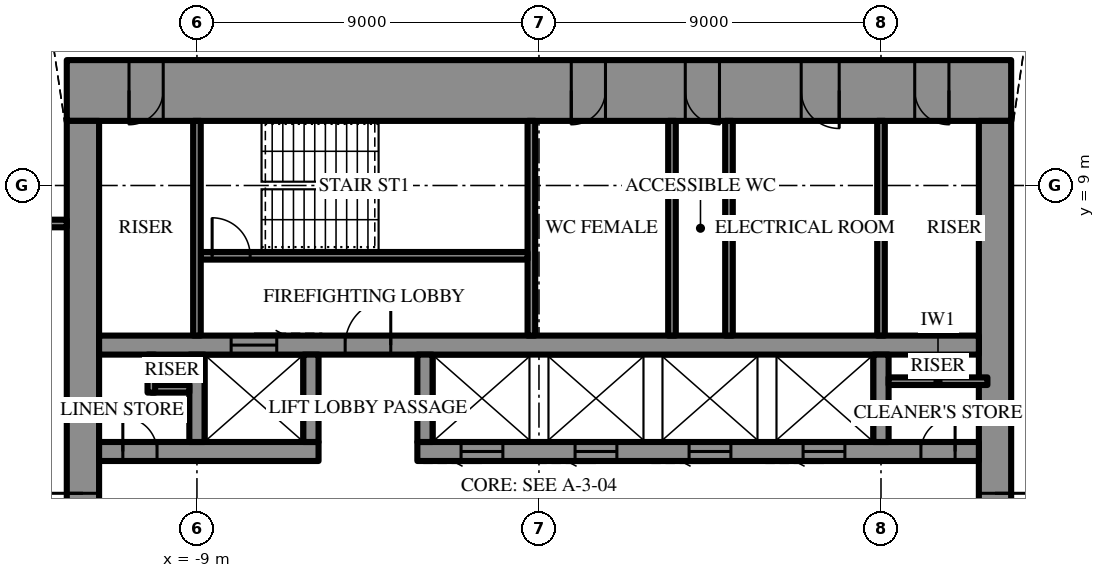
"""IFC4 building model, lengths in metres.
Left out: names, types, materials, properties, quantities, classifications, styles, units other than length and angle.
Written with IfcOpenShell. Run it as: python <this file> out.ifc"""

import sys

from ifc_helpers import new_model, si_unit, direction, frame, frame_2d, origin, place, context, subcontext, project, spatial, rectangle, extrude, element, fill, save


model = new_model("IFC4")
c1 = context("Model", 3, precision=1e-05, world=origin(), true_north=direction((0.0, 1.0)))
c2 = subcontext(c1, "Body", "Model", "MODEL_VIEW")
j1 = project(units=[si_unit("LENGTHUNIT", "METRE"), si_unit("PLANEANGLEUNIT", "RADIAN")], contexts=[c1])
p1 = place(None, origin())
s1 = spatial("IfcSite", under=j1, at=p1, CompositionType="ELEMENT")
p2 = place(p1, origin())
s2 = spatial("IfcBuilding", under=s1, at=p2, CompositionType="ELEMENT")
p3 = place(p2, frame((0.0, 0.0, 378.7)))
s3 = spatial("IfcBuildingStorey", under=s2, at=p3, CompositionType="ELEMENT", Elevation=378.7)
p4 = place(p3, frame((-12.425, 11.5, 0.0), z_axis=(0.0, 0.0, 1.0), x_axis=(1.0, 0.0, 0.0)))
e1 = element("IfcWall", 1, at=p4, inside=s3, PredefinedType="SHEAR", context=c2, shape_type="SweptSolid", body=[
    extrude(rectangle(XDim=24.85, YDim=1.6, at=frame_2d((12.425, 0.0))), origin(), (0.0, 0.0, 1.0), 4.2),
])
p5 = place(p4, frame((13.275, 0.0, 0.0)))
e2 = element("IfcOpeningElement", 2, at=p5, cuts=e1, PredefinedType="OPENING", context=c2, shape_type="SweptSolid", body=[
    extrude(rectangle(XDim=0.9, YDim=2.2, at=frame_2d((0.45, 1.1))), frame((0.0, 0.81, 0.0), z_axis=(0.0, -1.0, 0.0), x_axis=(1.0, 0.0, 0.0)), (0.0, 0.0, 1.0), 1.62),
])
p6 = place(p4, frame((16.275, 0.0, 0.0)))
e3 = element("IfcOpeningElement", 3, at=p6, cuts=e1, PredefinedType="OPENING", context=c2, shape_type="SweptSolid", body=[
    extrude(rectangle(XDim=0.9, YDim=2.2, at=frame_2d((0.45, 1.1))), frame((0.0, 0.81, 0.0), z_axis=(0.0, -1.0, 0.0), x_axis=(1.0, 0.0, 0.0)), (0.0, 0.0, 1.0), 1.62),
])
p7 = place(p4, frame((19.325, 0.0, 0.0)))
e4 = element("IfcOpeningElement", 4, at=p7, cuts=e1, PredefinedType="OPENING", context=c2, shape_type="SweptSolid", body=[
    extrude(rectangle(XDim=1.0, YDim=2.2, at=frame_2d((0.5, 1.1))), frame((0.0, 0.81, 0.0), z_axis=(0.0, -1.0, 0.0), x_axis=(1.0, 0.0, 0.0)), (0.0, 0.0, 1.0), 1.62),
])
p8 = place(p4, frame((1.637, 0.0, 0.0)))
e5 = element("IfcOpeningElement", 5, at=p8, cuts=e1, PredefinedType="OPENING", context=c2, shape_type="SweptSolid", body=[
    extrude(rectangle(XDim=0.9, YDim=2.2, at=frame_2d((0.45, 1.1))), frame((0.0, 0.81, 0.0), z_axis=(0.0, -1.0, 0.0), x_axis=(1.0, 0.0, 0.0)), (0.0, 0.0, 1.0), 1.62),
])
p9 = place(p4, frame((22.312, 0.0, 0.0)))
e6 = element("IfcOpeningElement", 6, at=p9, cuts=e1, PredefinedType="OPENING", context=c2, shape_type="SweptSolid", body=[
    extrude(rectangle(XDim=0.9, YDim=2.2, at=frame_2d((0.45, 1.1))), frame((0.0, 0.81, 0.0), z_axis=(0.0, -1.0, 0.0), x_axis=(1.0, 0.0, 0.0)), (0.0, 0.0, 1.0), 1.62),
])
p10 = place(p3, frame((12.0, -10.7, 0.0), z_axis=(0.0, 0.0, 1.0), x_axis=(0.0, 1.0, 0.0)))
e7 = element("IfcWall", 7, at=p10, inside=s3, PredefinedType="SHEAR", context=c2, shape_type="SweptSolid", body=[
    extrude(rectangle(XDim=21.4, YDim=0.85, at=frame_2d((10.7, 0.0))), origin(), (0.0, 0.0, 1.0), 4.2),
])
p11 = place(p10, frame((9.8, 0.0, 0.0)))
e8 = element("IfcOpeningElement", 8, at=p11, cuts=e7, PredefinedType="OPENING", context=c2, shape_type="SweptSolid", body=[
    extrude(rectangle(XDim=1.8, YDim=2.4, at=frame_2d((0.9, 1.2))), frame((0.0, 0.435, 0.0), z_axis=(0.0, -1.0, 0.0), x_axis=(1.0, 0.0, 0.0)), (0.0, 0.0, 1.0), 0.87),
])
p12 = place(p3, frame((-12.0, 10.7, 0.0), z_axis=(0.0, 0.0, 1.0), x_axis=(0.0, -1.0, 0.0)))
e9 = element("IfcWall", 9, at=p12, inside=s3, PredefinedType="SHEAR", context=c2, shape_type="SweptSolid", body=[
    extrude(rectangle(XDim=21.4, YDim=0.85, at=frame_2d((10.7, 0.0))), origin(), (0.0, 0.0, 1.0), 4.2),
])
p13 = place(p12, frame((9.8, 0.0, 0.0)))
e10 = element("IfcOpeningElement", 10, at=p13, cuts=e9, PredefinedType="OPENING", context=c2, shape_type="SweptSolid", body=[
    extrude(rectangle(XDim=1.8, YDim=2.4, at=frame_2d((0.9, 1.2))), frame((0.0, 0.435, 0.0), z_axis=(0.0, -1.0, 0.0), x_axis=(1.0, 0.0, 0.0)), (0.0, 0.0, 1.0), 0.87),
])
p14 = place(p3, frame((-11.575, 2.0, 0.0), z_axis=(0.0, 0.0, 1.0), x_axis=(1.0, 0.0, 0.0)))
e11 = element("IfcWall", 11, at=p14, inside=s3, PredefinedType="SHEAR", context=c2, shape_type="SweptSolid", body=[
    extrude(rectangle(XDim=5.775, YDim=0.5, at=frame_2d((2.887, 0.0))), origin(), (0.0, 0.0, 1.0), 4.2),
])
p15 = place(p14, frame((0.625, 0.0, 0.0)))
e12 = element("IfcOpeningElement", 12, at=p15, cuts=e11, PredefinedType="OPENING", context=c2, shape_type="SweptSolid", body=[
    extrude(rectangle(XDim=0.9, YDim=2.2, at=frame_2d((0.45, 1.1))), frame((0.0, 0.26, 0.0), z_axis=(0.0, -1.0, 0.0), x_axis=(1.0, 0.0, 0.0)), (0.0, 0.0, 1.0), 0.52),
])
p16 = place(p3, frame((-3.2, 2.0, 0.0), z_axis=(0.0, 0.0, 1.0), x_axis=(1.0, 0.0, 0.0)))
e13 = element("IfcWall", 13, at=p16, inside=s3, PredefinedType="SHEAR", context=c2, shape_type="SweptSolid", body=[
    extrude(rectangle(XDim=14.775, YDim=0.5, at=frame_2d((7.387, 0.0))), origin(), (0.0, 0.0, 1.0), 4.2),
])
p17 = place(p16, frame((13.25, 0.0, 0.0)))
e14 = element("IfcOpeningElement", 14, at=p17, cuts=e13, PredefinedType="OPENING", context=c2, shape_type="SweptSolid", body=[
    extrude(rectangle(XDim=0.9, YDim=2.2, at=frame_2d((0.45, 1.1))), frame((0.0, 0.26, 0.0), z_axis=(0.0, -1.0, 0.0), x_axis=(1.0, 0.0, 0.0)), (0.0, 0.0, 1.0), 0.52),
])
p18 = place(p16, frame((1.15, 0.0, 0.0)))
e15 = element("IfcOpeningElement", 15, at=p18, cuts=e13, PredefinedType="OPENING", context=c2, shape_type="SweptSolid", body=[
    extrude(rectangle(XDim=1.1, YDim=2.2, at=frame_2d((0.55, 1.1))), frame((0.0, 0.26, 0.0), z_axis=(0.0, -1.0, 0.0), x_axis=(1.0, 0.0, 0.0)), (0.0, 0.0, 1.0), 0.52),
])
p19 = place(p16, frame((4.15, 0.0, 0.0)))
e16 = element("IfcOpeningElement", 16, at=p19, cuts=e13, PredefinedType="OPENING", context=c2, shape_type="SweptSolid", body=[
    extrude(rectangle(XDim=1.1, YDim=2.2, at=frame_2d((0.55, 1.1))), frame((0.0, 0.26, 0.0), z_axis=(0.0, -1.0, 0.0), x_axis=(1.0, 0.0, 0.0)), (0.0, 0.0, 1.0), 0.52),
])
p20 = place(p16, frame((7.15, 0.0, 0.0)))
e17 = element("IfcOpeningElement", 17, at=p20, cuts=e13, PredefinedType="OPENING", context=c2, shape_type="SweptSolid", body=[
    extrude(rectangle(XDim=1.1, YDim=2.2, at=frame_2d((0.55, 1.1))), frame((0.0, 0.26, 0.0), z_axis=(0.0, -1.0, 0.0), x_axis=(1.0, 0.0, 0.0)), (0.0, 0.0, 1.0), 0.52),
])
p21 = place(p16, frame((10.15, 0.0, 0.0)))
e18 = element("IfcOpeningElement", 18, at=p21, cuts=e13, PredefinedType="OPENING", context=c2, shape_type="SweptSolid", body=[
    extrude(rectangle(XDim=1.1, YDim=2.2, at=frame_2d((0.55, 1.1))), frame((0.0, 0.26, 0.0), z_axis=(0.0, -1.0, 0.0), x_axis=(1.0, 0.0, 0.0)), (0.0, 0.0, 1.0), 0.52),
])
p22 = place(p3, frame((-11.575, 4.8, 0.0), z_axis=(0.0, 0.0, 1.0), x_axis=(1.0, 0.0, 0.0)))
e19 = element("IfcWall", 19, at=p22, inside=s3, PredefinedType="SHEAR", context=c2, shape_type="SweptSolid", body=[
    extrude(rectangle(XDim=23.15, YDim=0.5, at=frame_2d((11.575, 0.0))), origin(), (0.0, 0.0, 1.0), 4.2),
])
p23 = place(p22, frame((6.475, 0.0, 0.0)))
e20 = element("IfcOpeningElement", 20, at=p23, cuts=e19, PredefinedType="OPENING", context=c2, shape_type="SweptSolid", body=[
    extrude(rectangle(XDim=1.2, YDim=2.2, at=frame_2d((0.6, 1.1))), frame((0.0, 0.26, 0.0), z_axis=(0.0, -1.0, 0.0), x_axis=(1.0, 0.0, 0.0)), (0.0, 0.0, 1.0), 0.52),
])
p24 = place(p22, frame((3.475, 0.0, 0.0)))
e21 = element("IfcOpeningElement", 21, at=p24, cuts=e19, PredefinedType="OPENING", context=c2, shape_type="SweptSolid", body=[
    extrude(rectangle(XDim=1.2, YDim=2.2, at=frame_2d((0.6, 1.1))), frame((0.0, 0.26, 0.0), z_axis=(0.0, -1.0, 0.0), x_axis=(1.0, 0.0, 0.0)), (0.0, 0.0, 1.0), 0.52),
])
for number, where, z_axis, x_axis in (
    (22, (-9.0, 2.25, 0.0), (0.0, 0.0, 1.0), (0.0, 1.0, 0.0)),
    (23, (-6.0, 2.25, 0.0), (0.0, 0.0, 1.0), (0.0, 1.0, 0.0)),
    (24, (-3.0, 2.25, 0.0), (0.0, 0.0, 1.0), (0.0, 1.0, 0.0)),
    (25, (9.0, 2.25, 0.0), (0.0, 0.0, 1.0), (0.0, 1.0, 0.0)),
):
    element("IfcWall", number, at=place(p3, frame(where, z_axis=z_axis, x_axis=x_axis)), inside=s3, PredefinedType="SHEAR", context=c2, shape_type="SweptSolid", body=[
        extrude(rectangle(XDim=2.3, YDim=0.4, at=frame_2d((1.15, 0.0))), origin(), (0.0, 0.0, 1.0), 4.2),
    ])
p25 = place(p3, frame((-0.2, 5.05, 0.0), z_axis=(0.0, 0.0, 1.0), x_axis=(0.0, 1.0, 0.0)))
e26 = element("IfcWall", 26, at=p25, inside=s3, PredefinedType="SHEAR", context=c2, shape_type="SweptSolid", body=[
    extrude(rectangle(XDim=5.65, YDim=0.2, at=frame_2d((2.825, 0.0))), origin(), (0.0, 0.0, 1.0), 4.2),
])
p26 = place(p3, frame((-8.9, 7.15, 0.0), z_axis=(0.0, 0.0, 1.0), x_axis=(1.0, 0.0, 0.0)))
e27 = element("IfcWall", 27, at=p26, inside=s3, PredefinedType="SHEAR", context=c2, shape_type="SweptSolid", body=[
    extrude(rectangle(XDim=8.6, YDim=0.2, at=frame_2d((4.3, 0.0))), origin(), (0.0, 0.0, 1.0), 4.2),
])
p27 = place(p26, frame((0.3, 0.0, 0.0)))
e28 = element("IfcOpeningElement", 28, at=p27, cuts=e27, PredefinedType="OPENING", context=c2, shape_type="SweptSolid", body=[
    extrude(rectangle(XDim=1.0, YDim=2.2, at=frame_2d((0.5, 1.1))), frame((0.0, 0.11, 0.0), z_axis=(0.0, -1.0, 0.0), x_axis=(1.0, 0.0, 0.0)), (0.0, 0.0, 1.0), 0.22),
])
for number, where, z_axis, x_axis in (
    (29, (-9.0, 5.05, 0.0), (0.0, 0.0, 1.0), (0.0, 1.0, 0.0)),
    (30, (9.0, 5.05, 0.0), (0.0, 0.0, 1.0), (0.0, 1.0, 0.0)),
    (31, (3.5, 5.05, 0.0), (0.0, 0.0, 1.0), (0.0, 1.0, 0.0)),
    (32, (5.0, 5.05, 0.0), (0.0, 0.0, 1.0), (0.0, 1.0, 0.0)),
):
    element("IfcWall", number, at=place(p3, frame(where, z_axis=z_axis, x_axis=x_axis)), inside=s3, PredefinedType="PARTITIONING", context=c2, shape_type="SweptSolid", body=[
        extrude(rectangle(XDim=5.65, YDim=0.2, at=frame_2d((2.825, 0.0))), origin(), (0.0, 0.0, 1.0), 4.0),
    ])
for number, where, z_axis, x_axis in (
    (33, (-10.2, 3.65, 0.0), (0.0, 0.0, 1.0), (1.0, 0.0, 0.0)),
    (34, (-10.2, 3.55, 0.0), (0.0, 0.0, 1.0), (0.0, 1.0, 0.0)),
):
    element("IfcWall", number, at=place(p3, frame(where, z_axis=z_axis, x_axis=x_axis)), inside=s3, PredefinedType="PARTITIONING", context=c2, shape_type="SweptSolid", body=[
        extrude(rectangle(XDim=1.0, YDim=0.2, at=frame_2d((0.5, 0.0))), origin(), (0.0, 0.0, 1.0), 4.0),
    ])
p28 = place(p3, frame((9.2, 3.85, 0.0), z_axis=(0.0, 0.0, 1.0), x_axis=(1.0, 0.0, 0.0)))
e35 = element("IfcWall", 35, at=p28, inside=s3, PredefinedType="PARTITIONING", context=c2, shape_type="SweptSolid", body=[
    extrude(rectangle(XDim=2.6, YDim=0.2, at=frame_2d((1.3, 0.0))), origin(), (0.0, 0.0, 1.0), 4.0),
])
p29 = place(p3, frame((-12.425, 8.0, 0.0), z_axis=(0.0, 0.0, 1.0), x_axis=(-1.0, 0.0, 0.0)))
e36 = element("IfcWall", 36, at=p29, inside=s3, PredefinedType="PARTITIONING", context=c2, shape_type="SweptSolid", body=[
    extrude(rectangle(XDim=13.59, YDim=0.2, at=frame_2d((6.795, 0.0))), origin(), (0.0, 0.0, 1.0), 4.0),
])
p30 = place(p29, frame((0.859, 0.0, 0.0)))
e37 = element("IfcOpeningElement", 37, at=p30, cuts=e36, PredefinedType="OPENING", context=c2, shape_type="SweptSolid", body=[
    extrude(rectangle(XDim=1.0, YDim=2.2, at=frame_2d((0.5, 1.1))), frame((0.0, 0.11, 0.0), z_axis=(0.0, -1.0, 0.0), x_axis=(1.0, 0.0, 0.0)), (0.0, 0.0, 1.0), 0.22),
])
p31 = place(p11, frame((1.8, 0.0, 0.0), z_axis=(0.0, 0.0, 1.0), x_axis=(-1.0, 0.0, 0.0)))
e38 = element("IfcDoor", 38, at=p31, inside=s3, OperationType="DOUBLE_DOOR_SINGLE_SWING", PredefinedType="DOOR", context=c2, shape_type="SweptSolid", body=[
    extrude(rectangle(XDim=1.8, YDim=2.4, at=frame_2d((0.9, 1.2))), frame((0.0, 0.025, 0.0), z_axis=(0.0, -1.0, 0.0), x_axis=(1.0, 0.0, 0.0)), (0.0, 0.0, 1.0), 0.05),
])
fill(e8, e38)
p32 = place(p13, frame((1.8, 0.0, 0.0), z_axis=(0.0, 0.0, 1.0), x_axis=(-1.0, 0.0, 0.0)))
e39 = element("IfcDoor", 39, at=p32, inside=s3, OperationType="DOUBLE_DOOR_SINGLE_SWING", PredefinedType="DOOR", context=c2, shape_type="SweptSolid", body=[
    extrude(rectangle(XDim=1.8, YDim=2.4, at=frame_2d((0.9, 1.2))), frame((0.0, 0.025, 0.0), z_axis=(0.0, -1.0, 0.0), x_axis=(1.0, 0.0, 0.0)), (0.0, 0.0, 1.0), 0.05),
])
fill(e10, e39)
p33 = place(p23, origin())
e40 = element("IfcDoor", 40, at=p33, inside=s3, OperationType="SINGLE_SWING_LEFT", PredefinedType="DOOR", context=c2, shape_type="SweptSolid", body=[
    extrude(rectangle(XDim=1.2, YDim=2.2, at=frame_2d((0.6, 1.1))), frame((0.0, 0.025, 0.0), z_axis=(0.0, -1.0, 0.0), x_axis=(1.0, 0.0, 0.0)), (0.0, 0.0, 1.0), 0.05),
])
fill(e20, e40)
p34 = place(p27, origin())
e41 = element("IfcDoor", 41, at=p34, inside=s3, OperationType="SINGLE_SWING_RIGHT", PredefinedType="DOOR", context=c2, shape_type="SweptSolid", body=[
    extrude(rectangle(XDim=1.0, YDim=2.2, at=frame_2d((0.5, 1.1))), frame((0.0, 0.025, 0.0), z_axis=(0.0, -1.0, 0.0), x_axis=(1.0, 0.0, 0.0)), (0.0, 0.0, 1.0), 0.05),
])
fill(e28, e41)
p35 = place(p5, frame((0.9, 0.0, 0.0), z_axis=(0.0, 0.0, 1.0), x_axis=(-1.0, 0.0, 0.0)))
e42 = element("IfcDoor", 42, at=p35, inside=s3, OperationType="SINGLE_SWING_LEFT", PredefinedType="DOOR", context=c2, shape_type="SweptSolid", body=[
    extrude(rectangle(XDim=0.9, YDim=2.2, at=frame_2d((0.45, 1.1))), frame((0.0, 0.025, 0.0), z_axis=(0.0, -1.0, 0.0), x_axis=(1.0, 0.0, 0.0)), (0.0, 0.0, 1.0), 0.05),
])
fill(e2, e42)
p36 = place(p6, frame((0.9, 0.0, 0.0), z_axis=(0.0, 0.0, 1.0), x_axis=(-1.0, 0.0, 0.0)))
e43 = element("IfcDoor", 43, at=p36, inside=s3, OperationType="SINGLE_SWING_RIGHT", PredefinedType="DOOR", context=c2, shape_type="SweptSolid", body=[
    extrude(rectangle(XDim=0.9, YDim=2.2, at=frame_2d((0.45, 1.1))), frame((0.0, 0.025, 0.0), z_axis=(0.0, -1.0, 0.0), x_axis=(1.0, 0.0, 0.0)), (0.0, 0.0, 1.0), 0.05),
])
fill(e3, e43)
p37 = place(p7, frame((1.0, 0.0, 0.0), z_axis=(0.0, 0.0, 1.0), x_axis=(-1.0, 0.0, 0.0)))
e44 = element("IfcDoor", 44, at=p37, inside=s3, OperationType="SINGLE_SWING_RIGHT", PredefinedType="DOOR", context=c2, shape_type="SweptSolid", body=[
    extrude(rectangle(XDim=1.0, YDim=2.2, at=frame_2d((0.5, 1.1))), frame((0.0, 0.025, 0.0), z_axis=(0.0, -1.0, 0.0), x_axis=(1.0, 0.0, 0.0)), (0.0, 0.0, 1.0), 0.05),
])
fill(e4, e44)
p38 = place(p8, frame((0.9, 0.0, 0.0), z_axis=(0.0, 0.0, 1.0), x_axis=(-1.0, 0.0, 0.0)))
e45 = element("IfcDoor", 45, at=p38, inside=s3, OperationType="SINGLE_SWING_LEFT", PredefinedType="DOOR", context=c2, shape_type="SweptSolid", body=[
    extrude(rectangle(XDim=0.9, YDim=2.2, at=frame_2d((0.45, 1.1))), frame((0.0, 0.025, 0.0), z_axis=(0.0, -1.0, 0.0), x_axis=(1.0, 0.0, 0.0)), (0.0, 0.0, 1.0), 0.05),
])
fill(e5, e45)
p39 = place(p9, frame((0.9, 0.0, 0.0), z_axis=(0.0, 0.0, 1.0), x_axis=(-1.0, 0.0, 0.0)))
e46 = element("IfcDoor", 46, at=p39, inside=s3, OperationType="SINGLE_SWING_RIGHT", PredefinedType="DOOR", context=c2, shape_type="SweptSolid", body=[
    extrude(rectangle(XDim=0.9, YDim=2.2, at=frame_2d((0.45, 1.1))), frame((0.0, 0.025, 0.0), z_axis=(0.0, -1.0, 0.0), x_axis=(1.0, 0.0, 0.0)), (0.0, 0.0, 1.0), 0.05),
])
fill(e6, e46)
p40 = place(p15, origin())
e47 = element("IfcDoor", 47, at=p40, inside=s3, OperationType="SINGLE_SWING_RIGHT", PredefinedType="DOOR", context=c2, shape_type="SweptSolid", body=[
    extrude(rectangle(XDim=0.9, YDim=2.2, at=frame_2d((0.45, 1.1))), frame((0.0, 0.025, 0.0), z_axis=(0.0, -1.0, 0.0), x_axis=(1.0, 0.0, 0.0)), (0.0, 0.0, 1.0), 0.05),
])
fill(e12, e47)
p41 = place(p17, origin())
e48 = element("IfcDoor", 48, at=p41, inside=s3, OperationType="SINGLE_SWING_LEFT", PredefinedType="DOOR", context=c2, shape_type="SweptSolid", body=[
    extrude(rectangle(XDim=0.9, YDim=2.2, at=frame_2d((0.45, 1.1))), frame((0.0, 0.025, 0.0), z_axis=(0.0, -1.0, 0.0), x_axis=(1.0, 0.0, 0.0)), (0.0, 0.0, 1.0), 0.05),
])
fill(e14, e48)
p42 = place(p24, origin())
e49 = element("IfcDoor", 49, at=p42, inside=s3, OperationType="SLIDING_TO_LEFT", PredefinedType="DOOR", context=c2, shape_type="SweptSolid", body=[
    extrude(rectangle(XDim=1.2, YDim=2.2, at=frame_2d((0.6, 1.1))), frame((0.0, 0.025, 0.0), z_axis=(0.0, -1.0, 0.0), x_axis=(1.0, 0.0, 0.0)), (0.0, 0.0, 1.0), 0.05),
])
fill(e21, e49)
p43 = place(p18, frame((1.1, 0.0, 0.0), z_axis=(0.0, 0.0, 1.0), x_axis=(-1.0, 0.0, 0.0)))
e50 = element("IfcDoor", 50, at=p43, inside=s3, OperationType="SLIDING_TO_LEFT", PredefinedType="DOOR", context=c2, shape_type="SweptSolid", body=[
    extrude(rectangle(XDim=1.1, YDim=2.2, at=frame_2d((0.55, 1.1))), frame((0.0, 0.025, 0.0), z_axis=(0.0, -1.0, 0.0), x_axis=(1.0, 0.0, 0.0)), (0.0, 0.0, 1.0), 0.05),
])
fill(e15, e50)
p44 = place(p19, frame((1.1, 0.0, 0.0), z_axis=(0.0, 0.0, 1.0), x_axis=(-1.0, 0.0, 0.0)))
e51 = element("IfcDoor", 51, at=p44, inside=s3, OperationType="SLIDING_TO_LEFT", PredefinedType="DOOR", context=c2, shape_type="SweptSolid", body=[
    extrude(rectangle(XDim=1.1, YDim=2.2, at=frame_2d((0.55, 1.1))), frame((0.0, 0.025, 0.0), z_axis=(0.0, -1.0, 0.0), x_axis=(1.0, 0.0, 0.0)), (0.0, 0.0, 1.0), 0.05),
])
fill(e16, e51)
p45 = place(p20, frame((1.1, 0.0, 0.0), z_axis=(0.0, 0.0, 1.0), x_axis=(-1.0, 0.0, 0.0)))
e52 = element("IfcDoor", 52, at=p45, inside=s3, OperationType="SLIDING_TO_LEFT", PredefinedType="DOOR", context=c2, shape_type="SweptSolid", body=[
    extrude(rectangle(XDim=1.1, YDim=2.2, at=frame_2d((0.55, 1.1))), frame((0.0, 0.025, 0.0), z_axis=(0.0, -1.0, 0.0), x_axis=(1.0, 0.0, 0.0)), (0.0, 0.0, 1.0), 0.05),
])
fill(e17, e52)
p46 = place(p21, frame((1.1, 0.0, 0.0), z_axis=(0.0, 0.0, 1.0), x_axis=(-1.0, 0.0, 0.0)))
e53 = element("IfcDoor", 53, at=p46, inside=s3, OperationType="SLIDING_TO_LEFT", PredefinedType="DOOR", context=c2, shape_type="SweptSolid", body=[
    extrude(rectangle(XDim=1.1, YDim=2.2, at=frame_2d((0.55, 1.1))), frame((0.0, 0.025, 0.0), z_axis=(0.0, -1.0, 0.0), x_axis=(1.0, 0.0, 0.0)), (0.0, 0.0, 1.0), 0.05),
])
fill(e18, e53)
save(model, sys.argv[1])
